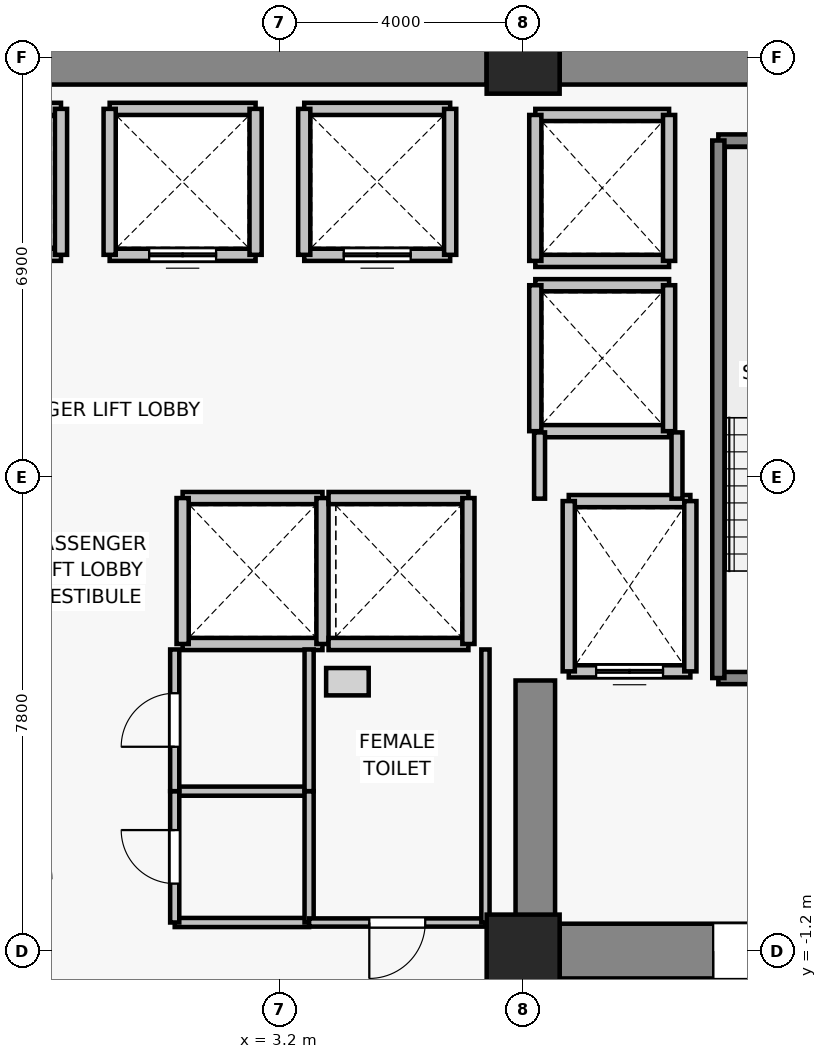
"""IFC4 building model, lengths in metres.
Left out: names, types, materials, properties, quantities, classifications, styles, units other than length and angle.
Written with IfcOpenShell. Run it as: python <this file> out.ifc"""

import sys

from ifc_helpers import new_model, si_unit, direction, frame, frame_2d, origin, origin_2d, place, context, subcontext, project, spatial, rectangle, extrude, source, transform, mapped, element, fill, save


model = new_model("IFC4")
c1 = context("Model", 3, precision=1e-05, world=origin(), true_north=direction((0.0, 1.0)))
c2 = subcontext(c1, "Body", "Model", "MODEL_VIEW")
j1 = project(units=[si_unit("LENGTHUNIT", "METRE"), si_unit("PLANEANGLEUNIT", "RADIAN")], contexts=[c1])
p1 = place(None, origin())
s1 = spatial("IfcSite", under=j1, at=p1, CompositionType="ELEMENT")
p2 = place(p1, origin())
s2 = spatial("IfcBuilding", under=s1, at=p2, CompositionType="ELEMENT")
p3 = place(p2, frame((0.0, 0.0, 63.7)))
s3 = spatial("IfcBuildingStorey", under=s2, at=p3, CompositionType="ELEMENT", Elevation=63.7)
for number, where, z_axis, x_axis in (
    (1, (7.2, -1.2, 0.0), (0.0, 0.0, 1.0), (1.0, 0.0, 0.0)),
    (2, (7.2, 13.5, 0.0), (0.0, 0.0, 1.0), (1.0, 0.0, 0.0)),
):
    element("IfcColumn", number, at=place(p3, frame(where, z_axis=z_axis, x_axis=x_axis)), inside=s3, PredefinedType="COLUMN", context=c2, shape_type="SweptSolid", body=[
        extrude(rectangle(XDim=1.2, YDim=1.2, at=origin_2d()), origin(), (0.0, 0.0, 1.0), 3.3),
    ])
p4 = place(p3, frame((-6.6, 13.5, 0.0), z_axis=(0.0, 0.0, 1.0), x_axis=(1.0, 0.0, 0.0)))
e3 = element("IfcWall", 3, at=p4, inside=s3, PredefinedType="SHEAR", context=c2, shape_type="SweptSolid", body=[
    extrude(rectangle(XDim=13.2, YDim=0.9, at=frame_2d((6.6, 0.0))), origin(), (0.0, 0.0, 1.0), 3.075),
])
p5 = place(p3, frame((7.8, 13.5, 0.0), z_axis=(0.0, 0.0, 1.0), x_axis=(1.0, 0.0, 0.0)))
e4 = element("IfcWall", 4, at=p5, inside=s3, PredefinedType="SHEAR", context=c2, shape_type="SweptSolid", body=[
    extrude(rectangle(XDim=6.0, YDim=0.9, at=frame_2d((3.0, 0.0))), origin(), (0.0, 0.0, 1.0), 3.075),
])
p6 = place(p3, frame((13.8, -1.2, 0.0), z_axis=(0.0, 0.0, 1.0), x_axis=(-1.0, 0.0, 0.0)))
e5 = element("IfcWall", 5, at=p6, inside=s3, PredefinedType="SHEAR", context=c2, shape_type="SweptSolid", body=[
    extrude(rectangle(XDim=6.0, YDim=0.9, at=frame_2d((3.0, 0.0))), origin(), (0.0, 0.0, 1.0), 3.075),
])
p7 = place(p6, frame((2.325, 0.0, 0.0)))
e6 = element("IfcOpeningElement", 6, at=p7, cuts=e5, PredefinedType="OPENING", context=c2, shape_type="SweptSolid", body=[
    extrude(rectangle(XDim=1.15, YDim=2.15, at=frame_2d((0.575, 1.075))), frame((0.0, 0.46, 0.0), z_axis=(0.0, -1.0, 0.0), x_axis=(1.0, 0.0, 0.0)), (0.0, 0.0, 1.0), 0.92),
])
p8 = place(p3, frame((7.4, -0.75, 0.0), z_axis=(0.0, 0.0, 1.0), x_axis=(0.0, 1.0, 0.0)))
e7 = element("IfcWall", 7, at=p8, inside=s3, PredefinedType="SHEAR", context=c2, shape_type="SweptSolid", body=[
    extrude(rectangle(XDim=4.0, YDim=0.65, at=frame_2d((2.0, 0.0))), origin(), (0.0, 0.0, 1.0), 3.075),
])
p9 = place(p3, frame((9.95, 3.4, 0.0), z_axis=(0.0, 0.0, 1.0), x_axis=(-1.0, 0.0, 0.0)))
e8 = element("IfcWall", 8, at=p9, inside=s3, PredefinedType="SOLIDWALL", context=c2, shape_type="SweptSolid", body=[
    extrude(rectangle(XDim=2.0, YDim=0.2, at=frame_2d((1.0, 0.0))), origin(), (0.0, 0.0, 1.0), 3.075),
])
p10 = place(p9, frame((0.45, 0.0, 0.0)))
e9 = element("IfcOpeningElement", 9, at=p10, cuts=e8, PredefinedType="OPENING", context=c2, shape_type="SweptSolid", body=[
    extrude(rectangle(XDim=1.1, YDim=2.2, at=frame_2d((0.55, 1.1))), frame((0.0, 0.11, 0.0), z_axis=(0.0, -1.0, 0.0), x_axis=(1.0, 0.0, 0.0)), (0.0, 0.0, 1.0), 0.22),
])
p11 = place(p3, frame((7.95, 6.2, 0.0), z_axis=(0.0, 0.0, 1.0), x_axis=(1.0, 0.0, 0.0)))
e10 = element("IfcWall", 10, at=p11, inside=s3, PredefinedType="SOLIDWALL", context=c2, shape_type="SweptSolid", body=[
    extrude(rectangle(XDim=2.0, YDim=0.2, at=frame_2d((1.0, 0.0))), origin(), (0.0, 0.0, 1.0), 3.075),
])
for number, where, z_axis, x_axis in (
    (11, (7.95, 3.4, 0.0), (0.0, 0.0, 1.0), (0.0, 1.0, 0.0)),
    (12, (9.95, 6.2, 0.0), (0.0, 0.0, 1.0), (0.0, -1.0, 0.0)),
):
    element("IfcWall", number, at=place(p3, frame(where, z_axis=z_axis, x_axis=x_axis)), inside=s3, PredefinedType="SOLIDWALL", context=c2, shape_type="SweptSolid", body=[
        extrude(rectangle(XDim=2.8, YDim=0.2, at=frame_2d((1.4, 0.0))), origin(), (0.0, 0.0, 1.0), 3.075),
    ])
p12 = place(p3, frame((-0.4, 10.25, 0.0), z_axis=(0.0, 0.0, 1.0), x_axis=(-1.0, 0.0, 0.0)))
e13 = element("IfcWall", 13, at=p12, inside=s3, PredefinedType="SOLIDWALL", context=c2, shape_type="SweptSolid", body=[
    extrude(rectangle(XDim=2.4, YDim=0.2, at=frame_2d((1.2, 0.0))), origin(), (0.0, 0.0, 1.0), 3.075),
])
p13 = place(p12, frame((0.65, 0.0, 0.0)))
e14 = element("IfcOpeningElement", 14, at=p13, cuts=e13, PredefinedType="OPENING", context=c2, shape_type="SweptSolid", body=[
    extrude(rectangle(XDim=1.1, YDim=2.2, at=frame_2d((0.55, 1.1))), frame((0.0, 0.11, 0.0), z_axis=(0.0, -1.0, 0.0), x_axis=(1.0, 0.0, 0.0)), (0.0, 0.0, 1.0), 0.22),
])
p14 = place(p3, frame((-2.8, 12.65, 0.0), z_axis=(0.0, 0.0, 1.0), x_axis=(1.0, 0.0, 0.0)))
e15 = element("IfcWall", 15, at=p14, inside=s3, PredefinedType="SOLIDWALL", context=c2, shape_type="SweptSolid", body=[
    extrude(rectangle(XDim=2.4, YDim=0.2, at=frame_2d((1.2, 0.0))), origin(), (0.0, 0.0, 1.0), 3.075),
])
p15 = place(p3, frame((-0.4, 12.65, 0.0), z_axis=(0.0, 0.0, 1.0), x_axis=(0.0, -1.0, 0.0)))
e16 = element("IfcWall", 16, at=p15, inside=s3, PredefinedType="SOLIDWALL", context=c2, shape_type="SweptSolid", body=[
    extrude(rectangle(XDim=2.4, YDim=0.2, at=frame_2d((1.2, 0.0))), origin(), (0.0, 0.0, 1.0), 3.075),
])
p16 = place(p3, frame((2.8, 10.25, 0.0), z_axis=(0.0, 0.0, 1.0), x_axis=(-1.0, 0.0, 0.0)))
e17 = element("IfcWall", 17, at=p16, inside=s3, PredefinedType="SOLIDWALL", context=c2, shape_type="SweptSolid", body=[
    extrude(rectangle(XDim=2.4, YDim=0.2, at=frame_2d((1.2, 0.0))), origin(), (0.0, 0.0, 1.0), 3.075),
])
p17 = place(p16, frame((0.65, 0.0, 0.0)))
e18 = element("IfcOpeningElement", 18, at=p17, cuts=e17, PredefinedType="OPENING", context=c2, shape_type="SweptSolid", body=[
    extrude(rectangle(XDim=1.1, YDim=2.2, at=frame_2d((0.55, 1.1))), frame((0.0, 0.11, 0.0), z_axis=(0.0, -1.0, 0.0), x_axis=(1.0, 0.0, 0.0)), (0.0, 0.0, 1.0), 0.22),
])
p18 = place(p3, frame((0.4, 12.65, 0.0), z_axis=(0.0, 0.0, 1.0), x_axis=(1.0, 0.0, 0.0)))
e19 = element("IfcWall", 19, at=p18, inside=s3, PredefinedType="SOLIDWALL", context=c2, shape_type="SweptSolid", body=[
    extrude(rectangle(XDim=2.4, YDim=0.2, at=frame_2d((1.2, 0.0))), origin(), (0.0, 0.0, 1.0), 3.075),
])
for number, where, z_axis, x_axis in (
    (20, (0.4, 10.25, 0.0), (0.0, 0.0, 1.0), (0.0, 1.0, 0.0)),
    (21, (2.8, 12.65, 0.0), (0.0, 0.0, 1.0), (0.0, -1.0, 0.0)),
):
    element("IfcWall", number, at=place(p3, frame(where, z_axis=z_axis, x_axis=x_axis)), inside=s3, PredefinedType="SOLIDWALL", context=c2, shape_type="SweptSolid", body=[
        extrude(rectangle(XDim=2.4, YDim=0.2, at=frame_2d((1.2, 0.0))), origin(), (0.0, 0.0, 1.0), 3.075),
    ])
p19 = place(p3, frame((6.0, 10.25, 0.0), z_axis=(0.0, 0.0, 1.0), x_axis=(-1.0, 0.0, 0.0)))
e22 = element("IfcWall", 22, at=p19, inside=s3, PredefinedType="SOLIDWALL", context=c2, shape_type="SweptSolid", body=[
    extrude(rectangle(XDim=2.4, YDim=0.2, at=frame_2d((1.2, 0.0))), origin(), (0.0, 0.0, 1.0), 3.075),
])
p20 = place(p19, frame((0.65, 0.0, 0.0)))
e23 = element("IfcOpeningElement", 23, at=p20, cuts=e22, PredefinedType="OPENING", context=c2, shape_type="SweptSolid", body=[
    extrude(rectangle(XDim=1.1, YDim=2.2, at=frame_2d((0.55, 1.1))), frame((0.0, 0.11, 0.0), z_axis=(0.0, -1.0, 0.0), x_axis=(1.0, 0.0, 0.0)), (0.0, 0.0, 1.0), 0.22),
])
for number, where, z_axis, x_axis in (
    (24, (3.6, 12.65, 0.0), (0.0, 0.0, 1.0), (1.0, 0.0, 0.0)),
    (25, (3.6, 10.25, 0.0), (0.0, 0.0, 1.0), (0.0, 1.0, 0.0)),
    (26, (6.0, 12.65, 0.0), (0.0, 0.0, 1.0), (0.0, -1.0, 0.0)),
):
    element("IfcWall", number, at=place(p3, frame(where, z_axis=z_axis, x_axis=x_axis)), inside=s3, PredefinedType="SOLIDWALL", context=c2, shape_type="SweptSolid", body=[
        extrude(rectangle(XDim=2.4, YDim=0.2, at=frame_2d((1.2, 0.0))), origin(), (0.0, 0.0, 1.0), 3.075),
    ])
for number, where, z_axis, x_axis in (
    (27, (3.9, 3.85, 0.0), (0.0, 0.0, 1.0), (-1.0, 0.0, 0.0)),
    (28, (1.6, 6.25, 0.0), (0.0, 0.0, 1.0), (1.0, 0.0, 0.0)),
):
    element("IfcWall", number, at=place(p3, frame(where, z_axis=z_axis, x_axis=x_axis)), inside=s3, PredefinedType="SOLIDWALL", context=c2, shape_type="SweptSolid", body=[
        extrude(rectangle(XDim=2.3, YDim=0.2, at=frame_2d((1.15, 0.0))), origin(), (0.0, 0.0, 1.0), 3.075),
    ])
for number, where, z_axis, x_axis in (
    (29, (1.6, 3.85, 0.0), (0.0, 0.0, 1.0), (0.0, 1.0, 0.0)),
    (30, (3.9, 6.25, 0.0), (0.0, 0.0, 1.0), (0.0, -1.0, 0.0)),
):
    element("IfcWall", number, at=place(p3, frame(where, z_axis=z_axis, x_axis=x_axis)), inside=s3, PredefinedType="SOLIDWALL", context=c2, shape_type="SweptSolid", body=[
        extrude(rectangle(XDim=2.4, YDim=0.2, at=frame_2d((1.2, 0.0))), origin(), (0.0, 0.0, 1.0), 3.075),
    ])
for number, where, z_axis, x_axis in (
    (31, (6.3, 3.85, 0.0), (0.0, 0.0, 1.0), (-1.0, 0.0, 0.0)),
    (32, (4.0, 6.25, 0.0), (0.0, 0.0, 1.0), (1.0, 0.0, 0.0)),
):
    element("IfcWall", number, at=place(p3, frame(where, z_axis=z_axis, x_axis=x_axis)), inside=s3, PredefinedType="SOLIDWALL", context=c2, shape_type="SweptSolid", body=[
        extrude(rectangle(XDim=2.3, YDim=0.2, at=frame_2d((1.15, 0.0))), origin(), (0.0, 0.0, 1.0), 3.075),
    ])
p21 = place(p3, frame((6.3, 6.25, 0.0), z_axis=(0.0, 0.0, 1.0), x_axis=(0.0, -1.0, 0.0)))
e33 = element("IfcWall", 33, at=p21, inside=s3, PredefinedType="SOLIDWALL", context=c2, shape_type="SweptSolid", body=[
    extrude(rectangle(XDim=2.4, YDim=0.2, at=frame_2d((1.2, 0.0))), origin(), (0.0, 0.0, 1.0), 3.075),
])
for number, where, z_axis, x_axis in (
    (34, (9.6, 7.35, 0.0), (0.0, 0.0, 1.0), (-1.0, 0.0, 0.0)),
    (35, (7.4, 9.75, 0.0), (0.0, 0.0, 1.0), (1.0, 0.0, 0.0)),
):
    element("IfcWall", number, at=place(p3, frame(where, z_axis=z_axis, x_axis=x_axis)), inside=s3, PredefinedType="SOLIDWALL", context=c2, shape_type="SweptSolid", body=[
        extrude(rectangle(XDim=2.2, YDim=0.2, at=frame_2d((1.1, 0.0))), origin(), (0.0, 0.0, 1.0), 2.465),
    ])
p22 = place(p3, frame((7.4, 7.35, 0.0), z_axis=(0.0, 0.0, 1.0), x_axis=(0.0, 1.0, 0.0)))
e36 = element("IfcWall", 36, at=p22, inside=s3, PredefinedType="SOLIDWALL", context=c2, shape_type="SweptSolid", body=[
    extrude(rectangle(XDim=2.4, YDim=0.2, at=frame_2d((1.2, 0.0))), origin(), (0.0, 0.0, 1.0), 2.465),
])
p23 = place(p3, frame((9.6, 9.75, 0.0), z_axis=(0.0, 0.0, 1.0), x_axis=(0.0, -1.0, 0.0)))
e37 = element("IfcWall", 37, at=p23, inside=s3, PredefinedType="SOLIDWALL", context=c2, shape_type="SweptSolid", body=[
    extrude(rectangle(XDim=2.4, YDim=0.2, at=frame_2d((1.2, 0.0))), origin(), (0.0, 0.0, 1.0), 3.075),
])
for number, where, z_axis, x_axis in (
    (38, (9.6, 10.15, 0.0), (0.0, 0.0, 1.0), (-1.0, 0.0, 0.0)),
    (39, (7.4, 12.55, 0.0), (0.0, 0.0, 1.0), (1.0, 0.0, 0.0)),
):
    element("IfcWall", number, at=place(p3, frame(where, z_axis=z_axis, x_axis=x_axis)), inside=s3, PredefinedType="SOLIDWALL", context=c2, shape_type="SweptSolid", body=[
        extrude(rectangle(XDim=2.2, YDim=0.2, at=frame_2d((1.1, 0.0))), origin(), (0.0, 0.0, 1.0), 2.465),
    ])
p24 = place(p3, frame((7.4, 10.15, 0.0), z_axis=(0.0, 0.0, 1.0), x_axis=(0.0, 1.0, 0.0)))
e40 = element("IfcWall", 40, at=p24, inside=s3, PredefinedType="SOLIDWALL", context=c2, shape_type="SweptSolid", body=[
    extrude(rectangle(XDim=2.4, YDim=0.2, at=frame_2d((1.2, 0.0))), origin(), (0.0, 0.0, 1.0), 2.465),
])
p25 = place(p3, frame((9.6, 12.55, 0.0), z_axis=(0.0, 0.0, 1.0), x_axis=(0.0, -1.0, 0.0)))
e41 = element("IfcWall", 41, at=p25, inside=s3, PredefinedType="SOLIDWALL", context=c2, shape_type="SweptSolid", body=[
    extrude(rectangle(XDim=2.4, YDim=0.2, at=frame_2d((1.2, 0.0))), origin(), (0.0, 0.0, 1.0), 3.075),
])
p26 = place(p3, frame((13.93, 3.29, 0.0), z_axis=(0.0, 0.0, 1.0), x_axis=(-1.0, 0.0, 0.0)))
e42 = element("IfcWall", 42, at=p26, inside=s3, PredefinedType="SOLIDWALL", context=c2, shape_type="SweptSolid", body=[
    extrude(rectangle(XDim=3.52, YDim=0.2, at=frame_2d((1.76, 0.0))), origin(), (0.0, 0.0, 1.0), 3.075),
])
p27 = place(p26, frame((1.205, 0.0, 0.0)))
e43 = element("IfcOpeningElement", 43, at=p27, cuts=e42, PredefinedType="OPENING", context=c2, shape_type="SweptSolid", body=[
    extrude(rectangle(XDim=1.15, YDim=2.15, at=frame_2d((0.575, 1.075))), frame((0.0, 0.11, 0.0), z_axis=(0.0, -1.0, 0.0), x_axis=(1.0, 0.0, 0.0)), (0.0, 0.0, 1.0), 0.22),
])
p28 = place(p3, frame((10.41, 12.13, 0.0), z_axis=(0.0, 0.0, 1.0), x_axis=(1.0, 0.0, 0.0)))
e44 = element("IfcWall", 44, at=p28, inside=s3, PredefinedType="SOLIDWALL", context=c2, shape_type="SweptSolid", body=[
    extrude(rectangle(XDim=3.52, YDim=0.2, at=frame_2d((1.76, 0.0))), origin(), (0.0, 0.0, 1.0), 3.075),
])
p29 = place(p3, frame((10.41, 3.29, 0.0), z_axis=(0.0, 0.0, 1.0), x_axis=(0.0, 1.0, 0.0)))
e45 = element("IfcWall", 45, at=p29, inside=s3, PredefinedType="SOLIDWALL", context=c2, shape_type="SweptSolid", body=[
    extrude(rectangle(XDim=8.84, YDim=0.2, at=frame_2d((4.42, 0.0))), origin(), (0.0, 0.0, 1.0), 3.075),
])
p30 = place(p3, frame((7.47, 6.24, 0.0), z_axis=(0.0, 0.0, 1.0), x_axis=(0.0, 1.0, 0.0)))
e46 = element("IfcWall", 46, at=p30, inside=s3, PredefinedType="PARTITIONING", context=c2, shape_type="SweptSolid", body=[
    extrude(rectangle(XDim=1.09, YDim=0.18, at=frame_2d((0.545, 0.0))), origin(), (0.0, 0.0, 1.0), 2.465),
])
p31 = place(p3, frame((9.73, 7.33, 0.0), z_axis=(0.0, 0.0, 1.0), x_axis=(0.0, -1.0, 0.0)))
e47 = element("IfcWall", 47, at=p31, inside=s3, PredefinedType="PARTITIONING", context=c2, shape_type="SweptSolid", body=[
    extrude(rectangle(XDim=1.09, YDim=0.18, at=frame_2d((0.545, 0.0))), origin(), (0.0, 0.0, 1.0), 3.075),
])
for number, where, z_axis, x_axis in (
    (48, (3.68, -0.73, 0.0), (0.0, 0.0, 1.0), (-1.0, 0.0, 0.0)),
    (49, (1.47, 1.43, 0.0), (0.0, 0.0, 1.0), (1.0, 0.0, 0.0)),
):
    element("IfcWall", number, at=place(p3, frame(where, z_axis=z_axis, x_axis=x_axis)), inside=s3, PredefinedType="PARTITIONING", context=c2, shape_type="SweptSolid", body=[
        extrude(rectangle(XDim=2.21, YDim=0.15, at=frame_2d((1.105, 0.0))), origin(), (0.0, 0.0, 1.0), 3.075),
    ])
p32 = place(p3, frame((1.47, -0.73, 0.0), z_axis=(0.0, 0.0, 1.0), x_axis=(0.0, 1.0, 0.0)))
e50 = element("IfcWall", 50, at=p32, inside=s3, PredefinedType="PARTITIONING", context=c2, shape_type="SweptSolid", body=[
    extrude(rectangle(XDim=2.16, YDim=0.15, at=frame_2d((1.08, 0.0))), origin(), (0.0, 0.0, 1.0), 3.075),
])
p33 = place(p32, frame((0.64, 0.0, 0.0)))
e51 = element("IfcOpeningElement", 51, at=p33, cuts=e50, PredefinedType="OPENING", context=c2, shape_type="SweptSolid", body=[
    extrude(rectangle(XDim=0.88, YDim=2.1, at=frame_2d((0.44, 1.05))), frame((0.0, 0.085, 0.0), z_axis=(0.0, -1.0, 0.0), x_axis=(1.0, 0.0, 0.0)), (0.0, 0.0, 1.0), 0.17),
])
p34 = place(p3, frame((3.68, 1.43, 0.0), z_axis=(0.0, 0.0, 1.0), x_axis=(0.0, -1.0, 0.0)))
e52 = element("IfcWall", 52, at=p34, inside=s3, PredefinedType="PARTITIONING", context=c2, shape_type="SweptSolid", body=[
    extrude(rectangle(XDim=2.16, YDim=0.15, at=frame_2d((1.08, 0.0))), origin(), (0.0, 0.0, 1.0), 3.075),
])
p35 = place(p3, frame((1.47, 1.43, 0.0), z_axis=(0.0, 0.0, 1.0), x_axis=(0.0, 1.0, 0.0)))
e53 = element("IfcWall", 53, at=p35, inside=s3, PredefinedType="PARTITIONING", context=c2, shape_type="SweptSolid", body=[
    extrude(rectangle(XDim=2.33, YDim=0.15, at=frame_2d((1.165, 0.0))), origin(), (0.0, 0.0, 1.0), 3.075),
])
p36 = place(p35, frame((0.73, 0.0, 0.0)))
e54 = element("IfcOpeningElement", 54, at=p36, cuts=e53, PredefinedType="OPENING", context=c2, shape_type="SweptSolid", body=[
    extrude(rectangle(XDim=0.88, YDim=2.15, at=frame_2d((0.44, 1.075))), frame((0.0, 0.085, 0.0), z_axis=(0.0, -1.0, 0.0), x_axis=(1.0, 0.0, 0.0)), (0.0, 0.0, 1.0), 0.17),
])
p37 = place(p3, frame((3.68, 3.76, 0.0), z_axis=(0.0, 0.0, 1.0), x_axis=(0.0, -1.0, 0.0)))
e55 = element("IfcWall", 55, at=p37, inside=s3, PredefinedType="PARTITIONING", context=c2, shape_type="SweptSolid", body=[
    extrude(rectangle(XDim=2.33, YDim=0.15, at=frame_2d((1.165, 0.0))), origin(), (0.0, 0.0, 1.0), 3.075),
])
p38 = place(p3, frame((6.58, -0.73, 0.0), z_axis=(0.0, 0.0, 1.0), x_axis=(-1.0, 0.0, 0.0)))
e56 = element("IfcWall", 56, at=p38, inside=s3, PredefinedType="PARTITIONING", context=c2, shape_type="SweptSolid", body=[
    extrude(rectangle(XDim=2.9, YDim=0.135, at=frame_2d((1.45, 0.0))), origin(), (0.0, 0.0, 1.0), 3.075),
])
p39 = place(p38, frame((0.99, 0.0, 0.0)))
e57 = element("IfcOpeningElement", 57, at=p39, cuts=e56, PredefinedType="OPENING", context=c2, shape_type="SweptSolid", body=[
    extrude(rectangle(XDim=0.92, YDim=2.1, at=frame_2d((0.46, 1.05))), frame((0.0, 0.077, 0.0), z_axis=(0.0, -1.0, 0.0), x_axis=(1.0, 0.0, 0.0)), (0.0, 0.0, 1.0), 0.155),
])
p40 = place(p3, frame((6.58, 3.76, 0.0), z_axis=(0.0, 0.0, 1.0), x_axis=(0.0, -1.0, 0.0)))
e58 = element("IfcWall", 58, at=p40, inside=s3, PredefinedType="PARTITIONING", context=c2, shape_type="SweptSolid", body=[
    extrude(rectangle(XDim=4.49, YDim=0.135, at=frame_2d((2.245, 0.0))), origin(), (0.0, 0.0, 1.0), 3.075),
])
m1 = source(origin(), c2, "Body", "SweptSolid", [
    extrude(rectangle(XDim=1.1, YDim=2.2, at=frame_2d((0.55, 1.1))), frame((0.0, 0.025, 0.0), z_axis=(0.0, -1.0, 0.0), x_axis=(1.0, 0.0, 0.0)), (0.0, 0.0, 1.0), 0.05),
])
p41 = place(p10, origin())
e59 = element("IfcDoor", 59, at=p41, inside=s3, OperationType="DOUBLE_DOOR_SLIDING", PredefinedType="DOOR", context=c2, shape_type="MappedRepresentation", body=[
    mapped(m1, transform((0.0, 0.0, 0.0), x_axis=(1.0, 0.0, 0.0), y_axis=(0.0, 1.0, 0.0), z_axis=(0.0, 0.0, 1.0), scale=1.0)),
])
fill(e9, e59)
p42 = place(p17, origin())
e60 = element("IfcDoor", 60, at=p42, inside=s3, OperationType="DOUBLE_DOOR_SLIDING", PredefinedType="DOOR", context=c2, shape_type="MappedRepresentation", body=[
    mapped(m1, transform((0.0, 0.0, 0.0), x_axis=(1.0, 0.0, 0.0), y_axis=(0.0, 1.0, 0.0), z_axis=(0.0, 0.0, 1.0), scale=1.0)),
])
fill(e18, e60)
p43 = place(p20, origin())
e61 = element("IfcDoor", 61, at=p43, inside=s3, OperationType="DOUBLE_DOOR_SLIDING", PredefinedType="DOOR", context=c2, shape_type="MappedRepresentation", body=[
    mapped(m1, transform((0.0, 0.0, 0.0), x_axis=(1.0, 0.0, 0.0), y_axis=(0.0, 1.0, 0.0), z_axis=(0.0, 0.0, 1.0), scale=1.0)),
])
fill(e23, e61)
m2 = source(origin(), c2, "Body", "SweptSolid", [
    extrude(rectangle(XDim=1.15, YDim=2.15, at=frame_2d((0.575, 1.075))), frame((0.0, 0.025, 0.0), z_axis=(0.0, -1.0, 0.0), x_axis=(1.0, 0.0, 0.0)), (0.0, 0.0, 1.0), 0.05),
])
p44 = place(p7, origin())
e62 = element("IfcDoor", 62, at=p44, inside=s3, OperationType="SINGLE_SWING_RIGHT", PredefinedType="DOOR", context=c2, shape_type="MappedRepresentation", body=[
    mapped(m2, transform((0.0, 0.0, 0.0), x_axis=(1.0, 0.0, 0.0), y_axis=(0.0, 1.0, 0.0), z_axis=(0.0, 0.0, 1.0), scale=1.0)),
])
fill(e6, e62)
m3 = source(origin(), c2, "Body", "SweptSolid", [
    extrude(rectangle(XDim=0.88, YDim=2.1, at=frame_2d((0.44, 1.05))), frame((0.0, 0.025, 0.0), z_axis=(0.0, -1.0, 0.0), x_axis=(1.0, 0.0, 0.0)), (0.0, 0.0, 1.0), 0.05),
])
p45 = place(p33, origin())
e63 = element("IfcDoor", 63, at=p45, inside=s3, OperationType="SINGLE_SWING_RIGHT", PredefinedType="DOOR", context=c2, shape_type="MappedRepresentation", body=[
    mapped(m3, transform((0.0, 0.0, 0.0), x_axis=(1.0, 0.0, 0.0), y_axis=(0.0, 1.0, 0.0), z_axis=(0.0, 0.0, 1.0), scale=1.0)),
])
fill(e51, e63)
m4 = source(origin(), c2, "Body", "SweptSolid", [
    extrude(rectangle(XDim=0.88, YDim=2.15, at=frame_2d((0.44, 1.075))), frame((0.0, 0.025, 0.0), z_axis=(0.0, -1.0, 0.0), x_axis=(1.0, 0.0, 0.0)), (0.0, 0.0, 1.0), 0.05),
])
p46 = place(p36, origin())
e64 = element("IfcDoor", 64, at=p46, inside=s3, OperationType="SINGLE_SWING_LEFT", PredefinedType="DOOR", context=c2, shape_type="MappedRepresentation", body=[
    mapped(m4, transform((0.0, 0.0, 0.0), x_axis=(1.0, 0.0, 0.0), y_axis=(0.0, 1.0, 0.0), z_axis=(0.0, 0.0, 1.0), scale=1.0)),
])
fill(e54, e64)
m5 = source(origin(), c2, "Body", "SweptSolid", [
    extrude(rectangle(XDim=0.92, YDim=2.1, at=frame_2d((0.46, 1.05))), frame((0.0, 0.025, 0.0), z_axis=(0.0, -1.0, 0.0), x_axis=(1.0, 0.0, 0.0)), (0.0, 0.0, 1.0), 0.05),
])
p47 = place(p39, origin())
e65 = element("IfcDoor", 65, at=p47, inside=s3, OperationType="SINGLE_SWING_RIGHT", PredefinedType="DOOR", context=c2, shape_type="MappedRepresentation", body=[
    mapped(m5, transform((0.0, 0.0, 0.0), x_axis=(1.0, 0.0, 0.0), y_axis=(0.0, 1.0, 0.0), z_axis=(0.0, 0.0, 1.0), scale=1.0)),
])
fill(e57, e65)
save(model, sys.argv[1])
